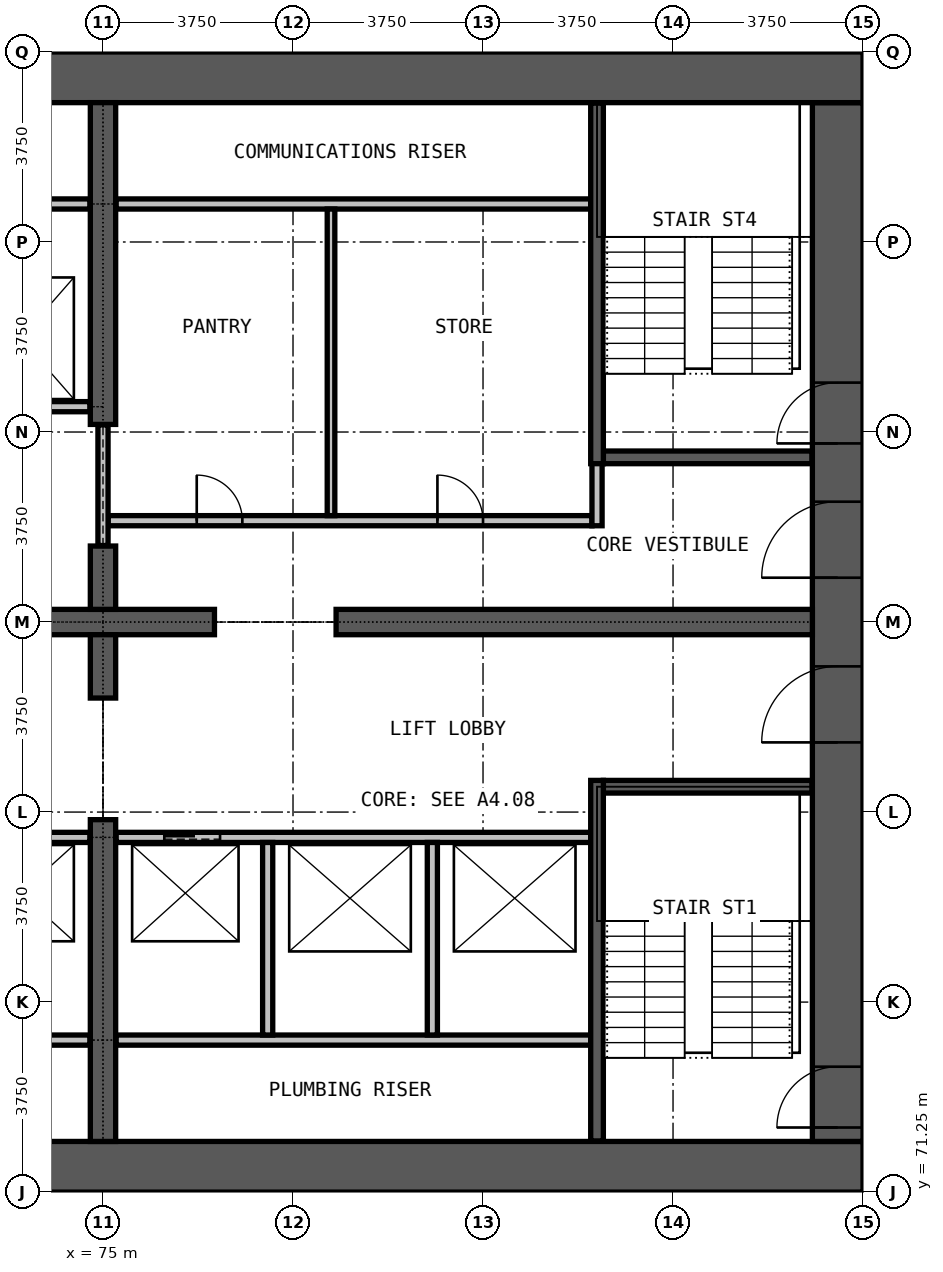
"""IFC4 building model, lengths in metres.
Left out: names, types, materials, properties, quantities, classifications, styles, units other than length and angle.
Written with IfcOpenShell. Run it as: python <this file> out.ifc"""

import sys

from ifc_helpers import new_model, si_unit, direction, frame, frame_2d, origin, place, context, subcontext, project, spatial, rectangle, extrude, element, fill, save


model = new_model("IFC4")
c1 = context("Model", 3, precision=1e-05, world=origin(), true_north=direction((0.0, 1.0)))
c2 = subcontext(c1, "Body", "Model", "MODEL_VIEW")
j1 = project(units=[si_unit("LENGTHUNIT", "METRE"), si_unit("PLANEANGLEUNIT", "RADIAN")], contexts=[c1])
p1 = place(None, origin())
s1 = spatial("IfcSite", under=j1, at=p1, CompositionType="ELEMENT")
p2 = place(p1, origin())
s2 = spatial("IfcBuilding", under=s1, at=p2, CompositionType="ELEMENT")
p3 = place(p2, frame((0.0, 0.0, 42.8)))
s3 = spatial("IfcBuildingStorey", under=s2, at=p3, CompositionType="ELEMENT", Elevation=42.8)
p4 = place(p3, frame((60.0, 71.75, 0.0), z_axis=(0.0, 0.0, 1.0), x_axis=(1.0, 0.0, 0.0)))
e1 = element("IfcWall", 1, at=p4, inside=s3, PredefinedType="SHEAR", context=c2, shape_type="SweptSolid", body=[
    extrude(rectangle(XDim=30.0, YDim=1.0, at=frame_2d((15.0, 0.0))), origin(), (0.0, 0.0, 1.0), 3.3),
])
p5 = place(p3, frame((89.5, 72.25, 0.0), z_axis=(0.0, 0.0, 1.0), x_axis=(0.0, 1.0, 0.0)))
e2 = element("IfcWall", 2, at=p5, inside=s3, PredefinedType="SHEAR", context=c2, shape_type="SweptSolid", body=[
    extrude(rectangle(XDim=20.5, YDim=1.0, at=frame_2d((10.25, 0.0))), origin(), (0.0, 0.0, 1.0), 3.3),
])
p6 = place(p5, frame((0.275, 0.0, 0.0)))
e3 = element("IfcOpeningElement", 3, at=p6, cuts=e2, PredefinedType="OPENING", context=c2, shape_type="SweptSolid", body=[
    extrude(rectangle(XDim=1.2, YDim=2.2, at=frame_2d((0.6, 1.1))), frame((0.0, 0.51, 0.0), z_axis=(0.0, -1.0, 0.0), x_axis=(1.0, 0.0, 0.0)), (0.0, 0.0, 1.0), 1.02),
])
p7 = place(p5, frame((13.775, 0.0, 0.0)))
e4 = element("IfcOpeningElement", 4, at=p7, cuts=e2, PredefinedType="OPENING", context=c2, shape_type="SweptSolid", body=[
    extrude(rectangle(XDim=1.2, YDim=2.2, at=frame_2d((0.6, 1.1))), frame((0.0, 0.51, 0.0), z_axis=(0.0, -1.0, 0.0), x_axis=(1.0, 0.0, 0.0)), (0.0, 0.0, 1.0), 1.02),
])
p8 = place(p5, frame((7.875, 0.0, 0.0)))
e5 = element("IfcOpeningElement", 5, at=p8, cuts=e2, PredefinedType="OPENING", context=c2, shape_type="SweptSolid", body=[
    extrude(rectangle(XDim=1.5, YDim=2.2, at=frame_2d((0.75, 1.1))), frame((0.0, 0.51, 0.0), z_axis=(0.0, -1.0, 0.0), x_axis=(1.0, 0.0, 0.0)), (0.0, 0.0, 1.0), 1.02),
])
p9 = place(p5, frame((11.125, 0.0, 0.0)))
e6 = element("IfcOpeningElement", 6, at=p9, cuts=e2, PredefinedType="OPENING", context=c2, shape_type="SweptSolid", body=[
    extrude(rectangle(XDim=1.5, YDim=2.2, at=frame_2d((0.75, 1.1))), frame((0.0, 0.51, 0.0), z_axis=(0.0, -1.0, 0.0), x_axis=(1.0, 0.0, 0.0)), (0.0, 0.0, 1.0), 1.02),
])
p10 = place(p3, frame((90.0, 93.25, 0.0), z_axis=(0.0, 0.0, 1.0), x_axis=(-1.0, 0.0, 0.0)))
e7 = element("IfcWall", 7, at=p10, inside=s3, PredefinedType="SHEAR", context=c2, shape_type="SweptSolid", body=[
    extrude(rectangle(XDim=30.0, YDim=1.0, at=frame_2d((15.0, 0.0))), origin(), (0.0, 0.0, 1.0), 3.3),
])
p11 = place(p3, frame((72.8, 82.5, 0.0), z_axis=(0.0, 0.0, 1.0), x_axis=(1.0, 0.0, 0.0)))
e8 = element("IfcWall", 8, at=p11, inside=s3, PredefinedType="SHEAR", context=c2, shape_type="SweptSolid", body=[
    extrude(rectangle(XDim=4.4, YDim=0.5, at=frame_2d((2.2, 0.0))), origin(), (0.0, 0.0, 1.0), 3.3),
])
p12 = place(p3, frame((79.6, 82.5, 0.0), z_axis=(0.0, 0.0, 1.0), x_axis=(1.0, 0.0, 0.0)))
e9 = element("IfcWall", 9, at=p12, inside=s3, PredefinedType="SHEAR", context=c2, shape_type="SweptSolid", body=[
    extrude(rectangle(XDim=9.4, YDim=0.5, at=frame_2d((4.7, 0.0))), origin(), (0.0, 0.0, 1.0), 3.3),
])
p13 = place(p3, frame((75.0, 72.25, 0.0), z_axis=(0.0, 0.0, 1.0), x_axis=(0.0, 1.0, 0.0)))
e10 = element("IfcWall", 10, at=p13, inside=s3, PredefinedType="SHEAR", context=c2, shape_type="SweptSolid", body=[
    extrude(rectangle(XDim=6.35, YDim=0.5, at=frame_2d((3.175, 0.0))), origin(), (0.0, 0.0, 1.0), 3.3),
])
for number, where, z_axis, x_axis in (
    (11, (75.0, 81.0, 0.0), (0.0, 0.0, 1.0), (0.0, 1.0, 0.0)),
    (12, (75.0, 82.75, 0.0), (0.0, 0.0, 1.0), (0.0, 1.0, 0.0)),
):
    element("IfcWall", number, at=place(p3, frame(where, z_axis=z_axis, x_axis=x_axis)), inside=s3, PredefinedType="SHEAR", context=c2, shape_type="SweptSolid", body=[
        extrude(rectangle(XDim=1.25, YDim=0.5, at=frame_2d((0.625, 0.0))), origin(), (0.0, 0.0, 1.0), 3.3),
    ])
p14 = place(p3, frame((75.0, 86.4, 0.0), z_axis=(0.0, 0.0, 1.0), x_axis=(0.0, 1.0, 0.0)))
e13 = element("IfcWall", 13, at=p14, inside=s3, PredefinedType="SHEAR", context=c2, shape_type="SweptSolid", body=[
    extrude(rectangle(XDim=6.35, YDim=0.5, at=frame_2d((3.175, 0.0))), origin(), (0.0, 0.0, 1.0), 3.3),
])
p15 = place(p3, frame((75.1, 84.5, 0.0), z_axis=(0.0, 0.0, 1.0), x_axis=(1.0, 0.0, 0.0)))
e14 = element("IfcWall", 14, at=p15, inside=s3, PredefinedType="PARTITIONING", context=c2, shape_type="SweptSolid", body=[
    extrude(rectangle(XDim=9.55, YDim=0.2, at=frame_2d((4.775, 0.0))), origin(), (0.0, 0.0, 1.0), 3.0),
])
p16 = place(p15, frame((1.75, 0.0, 0.0)))
e15 = element("IfcOpeningElement", 15, at=p16, cuts=e14, PredefinedType="OPENING", context=c2, shape_type="SweptSolid", body=[
    extrude(rectangle(XDim=0.9, YDim=2.2, at=frame_2d((0.45, 1.1))), frame((0.0, 0.11, 0.0), z_axis=(0.0, -1.0, 0.0), x_axis=(1.0, 0.0, 0.0)), (0.0, 0.0, 1.0), 0.22),
])
p17 = place(p15, frame((6.5, 0.0, 0.0)))
e16 = element("IfcOpeningElement", 16, at=p17, cuts=e14, PredefinedType="OPENING", context=c2, shape_type="SweptSolid", body=[
    extrude(rectangle(XDim=0.9, YDim=2.2, at=frame_2d((0.45, 1.1))), frame((0.0, 0.11, 0.0), z_axis=(0.0, -1.0, 0.0), x_axis=(1.0, 0.0, 0.0)), (0.0, 0.0, 1.0), 0.22),
])
p18 = place(p3, frame((75.26, 90.75, 0.0), z_axis=(0.0, 0.0, 1.0), x_axis=(1.0, 0.0, 0.0)))
e17 = element("IfcWall", 17, at=p18, inside=s3, PredefinedType="PARTITIONING", context=c2, shape_type="SweptSolid", body=[
    extrude(rectangle(XDim=9.365, YDim=0.2, at=frame_2d((4.683, 0.0))), origin(), (0.0, 0.0, 1.0), 3.0),
])
p19 = place(p3, frame((75.0, 84.01, 0.0), z_axis=(0.0, 0.0, 1.0), x_axis=(0.0, 1.0, 0.0)))
e18 = element("IfcWall", 18, at=p19, inside=s3, PredefinedType="PARTITIONING", context=c2, shape_type="SweptSolid", body=[
    extrude(rectangle(XDim=2.38, YDim=0.2, at=frame_2d((1.19, 0.0))), origin(), (0.0, 0.0, 1.0), 2.4),
])
p20 = place(p3, frame((84.75, 84.4, 0.0), z_axis=(0.0, 0.0, 1.0), x_axis=(0.0, 1.0, 0.0)))
e19 = element("IfcWall", 19, at=p20, inside=s3, PredefinedType="PARTITIONING", context=c2, shape_type="SweptSolid", body=[
    extrude(rectangle(XDim=1.475, YDim=0.2, at=frame_2d((0.738, 0.0))), origin(), (0.0, 0.0, 1.0), 3.0),
])
p21 = place(p3, frame((79.5, 84.6, 0.0), z_axis=(0.0, 0.0, 1.0), x_axis=(0.0, 1.0, 0.0)))
e20 = element("IfcWall", 20, at=p21, inside=s3, PredefinedType="PARTITIONING", context=c2, shape_type="SweptSolid", body=[
    extrude(rectangle(XDim=6.05, YDim=0.15, at=frame_2d((3.025, 0.0))), origin(), (0.0, 0.0, 1.0), 3.0),
])
for number, where, z_axis, x_axis in (
    (21, (65.375, 74.25, 0.0), (0.0, 0.0, 1.0), (1.0, 0.0, 0.0)),
    (22, (75.26, 74.25, 0.0), (0.0, 0.0, 1.0), (1.0, 0.0, 0.0)),
):
    element("IfcWall", number, at=place(p3, frame(where, z_axis=z_axis, x_axis=x_axis)), inside=s3, PredefinedType="PARTITIONING", context=c2, shape_type="SweptSolid", body=[
        extrude(rectangle(XDim=9.365, YDim=0.2, at=frame_2d((4.683, 0.0))), origin(), (0.0, 0.0, 1.0), 3.0),
    ])
p22 = place(p3, frame((65.375, 78.25, 0.0), z_axis=(0.0, 0.0, 1.0), x_axis=(1.0, 0.0, 0.0)))
e23 = element("IfcWall", 23, at=p22, inside=s3, PredefinedType="PARTITIONING", context=c2, shape_type="SweptSolid", body=[
    extrude(rectangle(XDim=9.365, YDim=0.2, at=frame_2d((4.683, 0.0))), origin(), (0.0, 0.0, 1.0), 3.0),
])
p23 = place(p22, frame((1.0, 0.0, 0.0)))
e24 = element("IfcOpeningElement", 24, at=p23, cuts=e23, PredefinedType="OPENING", context=c2, shape_type="SweptSolid", body=[
    extrude(rectangle(XDim=1.1, YDim=2.2, at=frame_2d((0.55, 1.1))), frame((0.0, 0.11, 0.0), z_axis=(0.0, -1.0, 0.0), x_axis=(1.0, 0.0, 0.0)), (0.0, 0.0, 1.0), 0.22),
])
p24 = place(p22, frame((4.175, 0.0, 0.0)))
e25 = element("IfcOpeningElement", 25, at=p24, cuts=e23, PredefinedType="OPENING", context=c2, shape_type="SweptSolid", body=[
    extrude(rectangle(XDim=1.1, YDim=2.2, at=frame_2d((0.55, 1.1))), frame((0.0, 0.11, 0.0), z_axis=(0.0, -1.0, 0.0), x_axis=(1.0, 0.0, 0.0)), (0.0, 0.0, 1.0), 0.22),
])
p25 = place(p22, frame((7.325, 0.0, 0.0)))
e26 = element("IfcOpeningElement", 26, at=p25, cuts=e23, PredefinedType="OPENING", context=c2, shape_type="SweptSolid", body=[
    extrude(rectangle(XDim=1.1, YDim=2.2, at=frame_2d((0.55, 1.1))), frame((0.0, 0.11, 0.0), z_axis=(0.0, -1.0, 0.0), x_axis=(1.0, 0.0, 0.0)), (0.0, 0.0, 1.0), 0.22),
])
p26 = place(p3, frame((75.26, 78.25, 0.0), z_axis=(0.0, 0.0, 1.0), x_axis=(1.0, 0.0, 0.0)))
e27 = element("IfcWall", 27, at=p26, inside=s3, PredefinedType="PARTITIONING", context=c2, shape_type="SweptSolid", body=[
    extrude(rectangle(XDim=9.365, YDim=0.2, at=frame_2d((4.683, 0.0))), origin(), (0.0, 0.0, 1.0), 3.0),
])
p27 = place(p26, frame((0.95, 0.0, 0.0)))
e28 = element("IfcOpeningElement", 28, at=p27, cuts=e27, PredefinedType="OPENING", context=c2, shape_type="SweptSolid", body=[
    extrude(rectangle(XDim=1.1, YDim=2.2, at=frame_2d((0.55, 1.1))), frame((0.0, 0.11, 0.0), z_axis=(0.0, -1.0, 0.0), x_axis=(1.0, 0.0, 0.0)), (0.0, 0.0, 1.0), 0.22),
])
p28 = place(p3, frame((65.375, 86.75, 0.0), z_axis=(0.0, 0.0, 1.0), x_axis=(1.0, 0.0, 0.0)))
e29 = element("IfcWall", 29, at=p28, inside=s3, PredefinedType="PARTITIONING", context=c2, shape_type="SweptSolid", body=[
    extrude(rectangle(XDim=9.365, YDim=0.2, at=frame_2d((4.683, 0.0))), origin(), (0.0, 0.0, 1.0), 3.0),
])
p29 = place(p28, frame((1.0, 0.0, 0.0)))
e30 = element("IfcOpeningElement", 30, at=p29, cuts=e29, PredefinedType="OPENING", context=c2, shape_type="SweptSolid", body=[
    extrude(rectangle(XDim=1.1, YDim=2.2, at=frame_2d((0.55, 1.1))), frame((0.0, 0.11, 0.0), z_axis=(0.0, -1.0, 0.0), x_axis=(1.0, 0.0, 0.0)), (0.0, 0.0, 1.0), 0.22),
])
p30 = place(p28, frame((4.175, 0.0, 0.0)))
e31 = element("IfcOpeningElement", 31, at=p30, cuts=e29, PredefinedType="OPENING", context=c2, shape_type="SweptSolid", body=[
    extrude(rectangle(XDim=1.1, YDim=2.2, at=frame_2d((0.55, 1.1))), frame((0.0, 0.11, 0.0), z_axis=(0.0, -1.0, 0.0), x_axis=(1.0, 0.0, 0.0)), (0.0, 0.0, 1.0), 0.22),
])
p31 = place(p28, frame((7.325, 0.0, 0.0)))
e32 = element("IfcOpeningElement", 32, at=p31, cuts=e29, PredefinedType="OPENING", context=c2, shape_type="SweptSolid", body=[
    extrude(rectangle(XDim=1.1, YDim=2.2, at=frame_2d((0.55, 1.1))), frame((0.0, 0.11, 0.0), z_axis=(0.0, -1.0, 0.0), x_axis=(1.0, 0.0, 0.0)), (0.0, 0.0, 1.0), 0.22),
])
p32 = place(p3, frame((65.375, 90.75, 0.0), z_axis=(0.0, 0.0, 1.0), x_axis=(1.0, 0.0, 0.0)))
e33 = element("IfcWall", 33, at=p32, inside=s3, PredefinedType="PARTITIONING", context=c2, shape_type="SweptSolid", body=[
    extrude(rectangle(XDim=9.365, YDim=0.2, at=frame_2d((4.683, 0.0))), origin(), (0.0, 0.0, 1.0), 3.0),
])
for number, where, z_axis, x_axis in (
    (34, (78.25, 74.35, 0.0), (0.0, 0.0, 1.0), (0.0, 1.0, 0.0)),
    (35, (81.5, 74.35, 0.0), (0.0, 0.0, 1.0), (0.0, 1.0, 0.0)),
):
    element("IfcWall", number, at=place(p3, frame(where, z_axis=z_axis, x_axis=x_axis)), inside=s3, PredefinedType="PARTITIONING", context=c2, shape_type="SweptSolid", body=[
        extrude(rectangle(XDim=3.8, YDim=0.2, at=frame_2d((1.9, 0.0))), origin(), (0.0, 0.0, 1.0), 3.0),
    ])
for number, where, z_axis, x_axis in (
    (36, (84.875, 79.25, 0.0), (0.0, 0.0, 1.0), (1.0, 0.0, 0.0)),
    (37, (84.875, 85.75, 0.0), (0.0, 0.0, 1.0), (1.0, 0.0, 0.0)),
):
    element("IfcWall", number, at=place(p3, frame(where, z_axis=z_axis, x_axis=x_axis)), inside=s3, PredefinedType="PARTITIONING", context=c2, shape_type="SweptSolid", body=[
        extrude(rectangle(XDim=4.115, YDim=0.25, at=frame_2d((2.058, 0.0))), origin(), (0.0, 0.0, 1.0), 3.0),
    ])
for number, where, z_axis, x_axis in (
    (38, (84.75, 72.26, 0.0), (0.0, 0.0, 1.0), (0.0, 1.0, 0.0)),
    (39, (84.75, 85.625, 0.0), (0.0, 0.0, 1.0), (0.0, 1.0, 0.0)),
):
    element("IfcWall", number, at=place(p3, frame(where, z_axis=z_axis, x_axis=x_axis)), inside=s3, PredefinedType="PARTITIONING", context=c2, shape_type="SweptSolid", body=[
        extrude(rectangle(XDim=7.115, YDim=0.25, at=frame_2d((3.558, 0.0))), origin(), (0.0, 0.0, 1.0), 3.0),
    ])
p33 = place(p27, origin())
e40 = element("IfcDoor", 40, at=p33, inside=s3, OperationType="DOUBLE_DOOR_SLIDING", PredefinedType="DOOR", context=c2, shape_type="SweptSolid", body=[
    extrude(rectangle(XDim=1.1, YDim=2.2, at=frame_2d((0.55, 1.1))), frame((0.0, 0.025, 0.0), z_axis=(0.0, -1.0, 0.0), x_axis=(1.0, 0.0, 0.0)), (0.0, 0.0, 1.0), 0.05),
])
fill(e28, e40)
p34 = place(p6, origin())
e41 = element("IfcDoor", 41, at=p34, inside=s3, OperationType="SINGLE_SWING_RIGHT", PredefinedType="DOOR", context=c2, shape_type="SweptSolid", body=[
    extrude(rectangle(XDim=1.2, YDim=2.2, at=frame_2d((0.6, 1.1))), frame((0.0, 0.025, 0.0), z_axis=(0.0, -1.0, 0.0), x_axis=(1.0, 0.0, 0.0)), (0.0, 0.0, 1.0), 0.05),
])
fill(e3, e41)
p35 = place(p7, origin())
e42 = element("IfcDoor", 42, at=p35, inside=s3, OperationType="SINGLE_SWING_LEFT", PredefinedType="DOOR", context=c2, shape_type="SweptSolid", body=[
    extrude(rectangle(XDim=1.2, YDim=2.2, at=frame_2d((0.6, 1.1))), frame((0.0, 0.025, 0.0), z_axis=(0.0, -1.0, 0.0), x_axis=(1.0, 0.0, 0.0)), (0.0, 0.0, 1.0), 0.05),
])
fill(e4, e42)
p36 = place(p8, origin())
e43 = element("IfcDoor", 43, at=p36, inside=s3, OperationType="DOUBLE_DOOR_SINGLE_SWING", PredefinedType="DOOR", context=c2, shape_type="SweptSolid", body=[
    extrude(rectangle(XDim=1.5, YDim=2.2, at=frame_2d((0.75, 1.1))), frame((0.0, 0.025, 0.0), z_axis=(0.0, -1.0, 0.0), x_axis=(1.0, 0.0, 0.0)), (0.0, 0.0, 1.0), 0.05),
])
fill(e5, e43)
p37 = place(p9, origin())
e44 = element("IfcDoor", 44, at=p37, inside=s3, OperationType="DOUBLE_DOOR_SINGLE_SWING", PredefinedType="DOOR", context=c2, shape_type="SweptSolid", body=[
    extrude(rectangle(XDim=1.5, YDim=2.2, at=frame_2d((0.75, 1.1))), frame((0.0, 0.025, 0.0), z_axis=(0.0, -1.0, 0.0), x_axis=(1.0, 0.0, 0.0)), (0.0, 0.0, 1.0), 0.05),
])
fill(e6, e44)
p38 = place(p16, origin())
e45 = element("IfcDoor", 45, at=p38, inside=s3, OperationType="SINGLE_SWING_LEFT", PredefinedType="DOOR", context=c2, shape_type="SweptSolid", body=[
    extrude(rectangle(XDim=0.9, YDim=2.2, at=frame_2d((0.45, 1.1))), frame((0.0, 0.025, 0.0), z_axis=(0.0, -1.0, 0.0), x_axis=(1.0, 0.0, 0.0)), (0.0, 0.0, 1.0), 0.05),
])
fill(e15, e45)
p39 = place(p17, origin())
e46 = element("IfcDoor", 46, at=p39, inside=s3, OperationType="SINGLE_SWING_RIGHT", PredefinedType="DOOR", context=c2, shape_type="SweptSolid", body=[
    extrude(rectangle(XDim=0.9, YDim=2.2, at=frame_2d((0.45, 1.1))), frame((0.0, 0.025, 0.0), z_axis=(0.0, -1.0, 0.0), x_axis=(1.0, 0.0, 0.0)), (0.0, 0.0, 1.0), 0.05),
])
fill(e16, e46)
save(model, sys.argv[1])
